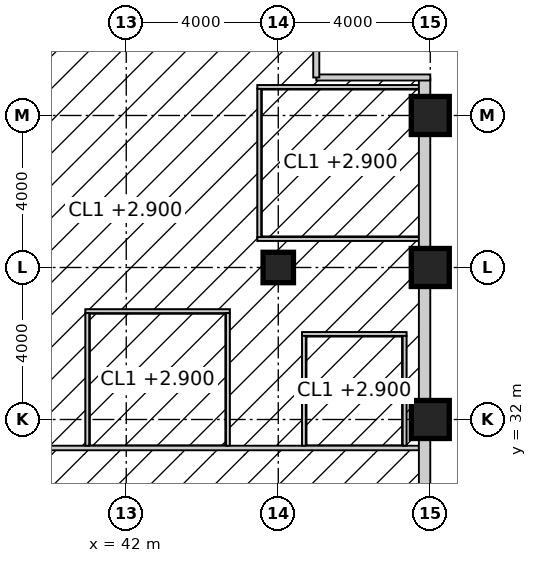
"""IFC4 building model, lengths in metres.
Left out: names, types, materials, properties, quantities, classifications, styles, units other than length and angle.
Written with IfcOpenShell. Run it as: python <this file> out.ifc"""

import sys

from ifc_helpers import new_model, si_unit, direction, frame, frame_2d, origin, origin_2d, place, context, subcontext, project, spatial, rectangle, hollow_rectangle, extrude, element, fill, save


model = new_model("IFC4")
c1 = context("Model", 3, precision=1e-05, world=origin(), true_north=direction((0.0, 1.0)))
c2 = subcontext(c1, "Body", "Model", "MODEL_VIEW")
j1 = project(units=[si_unit("LENGTHUNIT", "METRE"), si_unit("PLANEANGLEUNIT", "RADIAN")], contexts=[c1])
p1 = place(None, origin())
s1 = spatial("IfcSite", under=j1, at=p1, CompositionType="ELEMENT")
p2 = place(p1, origin())
s2 = spatial("IfcBuilding", under=s1, at=p2, CompositionType="ELEMENT")
p3 = place(p2, frame((0.0, 0.0, 254.2)))
s3 = spatial("IfcBuildingStorey", under=s2, at=p3, CompositionType="ELEMENT", Elevation=254.2)
for number, where, z_axis, x_axis in (
    (1, (50.0, 32.0, 0.0), (0.0, 0.0, 1.0), (1.0, 0.0, 0.0)),
    (2, (50.0, 36.0, 0.0), (0.0, 0.0, 1.0), (1.0, 0.0, 0.0)),
    (3, (50.0, 40.0, 0.0), (0.0, 0.0, 1.0), (1.0, 0.0, 0.0)),
):
    element("IfcColumn", number, at=place(p3, frame(where, z_axis=z_axis, x_axis=x_axis)), inside=s3, PredefinedType="COLUMN", context=c2, shape_type="SweptSolid", body=[
        extrude(hollow_rectangle(XDim=1.0, YDim=1.0, WallThickness=0.1, at=origin_2d()), origin(), (0.0, 0.0, 1.0), 4.0),
    ])
p4 = place(p3, frame((46.0, 36.0, 0.0), z_axis=(0.0, 0.0, 1.0), x_axis=(1.0, 0.0, 0.0)))
e4 = element("IfcColumn", 4, at=p4, inside=s3, PredefinedType="COLUMN", context=c2, shape_type="SweptSolid", body=[
    extrude(hollow_rectangle(XDim=0.8, YDim=0.8, WallThickness=0.08, at=origin_2d()), origin(), (0.0, 0.0, 1.0), 4.0),
])
p5 = place(p3, frame((38.575, 31.25, 0.0), z_axis=(0.0, 0.0, 1.0), x_axis=(1.0, 0.0, 0.0)))
e5 = element("IfcWall", 5, at=p5, inside=s3, PredefinedType="PARTITIONING", context=c2, shape_type="SweptSolid", body=[
    extrude(rectangle(XDim=11.125, YDim=0.12, at=frame_2d((5.562, 0.0))), origin(), (0.0, 0.0, 1.0), 3.85),
])
p6 = place(p3, frame((46.625, 34.25, 0.0), z_axis=(0.0, 0.0, 1.0), x_axis=(1.0, 0.0, 0.0)))
e6 = element("IfcWall", 6, at=p6, inside=s3, PredefinedType="PARTITIONING", context=c2, shape_type="SweptSolid", body=[
    extrude(rectangle(XDim=2.75, YDim=0.1, at=frame_2d((1.375, 0.0))), origin(), (0.0, 0.0, 1.0), 3.85),
])
p7 = place(p6, frame((0.875, 0.0, 0.0)))
e7 = element("IfcOpeningElement", 7, at=p7, cuts=e6, PredefinedType="OPENING", context=c2, shape_type="SweptSolid", body=[
    extrude(rectangle(XDim=1.0, YDim=2.2, at=frame_2d((0.5, 1.1))), frame((0.0, 0.06, 0.0), z_axis=(0.0, -1.0, 0.0), x_axis=(1.0, 0.0, 0.0)), (0.0, 0.0, 1.0), 0.12),
])
p8 = place(p3, frame((40.925, 34.85, 0.0), z_axis=(0.0, 0.0, 1.0), x_axis=(1.0, 0.0, 0.0)))
e8 = element("IfcWall", 8, at=p8, inside=s3, PredefinedType="PARTITIONING", context=c2, shape_type="SweptSolid", body=[
    extrude(rectangle(XDim=3.8, YDim=0.1, at=frame_2d((1.9, 0.0))), origin(), (0.0, 0.0, 1.0), 3.85),
])
p9 = place(p8, frame((1.4, 0.0, 0.0)))
e9 = element("IfcOpeningElement", 9, at=p9, cuts=e8, PredefinedType="OPENING", context=c2, shape_type="SweptSolid", body=[
    extrude(rectangle(XDim=1.0, YDim=2.2, at=frame_2d((0.5, 1.1))), frame((0.0, 0.06, 0.0), z_axis=(0.0, -1.0, 0.0), x_axis=(1.0, 0.0, 0.0)), (0.0, 0.0, 1.0), 0.12),
])
for number, where, z_axis, x_axis in (
    (10, (45.45, 36.75, 0.0), (0.0, 0.0, 1.0), (1.0, 0.0, 0.0)),
    (11, (45.45, 40.75, 0.0), (0.0, 0.0, 1.0), (1.0, 0.0, 0.0)),
):
    element("IfcWall", number, at=place(p3, frame(where, z_axis=z_axis, x_axis=x_axis)), inside=s3, PredefinedType="PARTITIONING", context=c2, shape_type="SweptSolid", body=[
        extrude(rectangle(XDim=4.25, YDim=0.1, at=frame_2d((2.125, 0.0))), origin(), (0.0, 0.0, 1.0), 3.85),
    ])
for number, where, z_axis, x_axis in (
    (12, (40.975, 31.31, 0.0), (0.0, 0.0, 1.0), (0.0, 1.0, 0.0)),
    (13, (44.675, 31.31, 0.0), (0.0, 0.0, 1.0), (0.0, 1.0, 0.0)),
):
    element("IfcWall", number, at=place(p3, frame(where, z_axis=z_axis, x_axis=x_axis)), inside=s3, PredefinedType="PARTITIONING", context=c2, shape_type="SweptSolid", body=[
        extrude(rectangle(XDim=3.49, YDim=0.1, at=frame_2d((1.745, 0.0))), origin(), (0.0, 0.0, 1.0), 3.85),
    ])
p10 = place(p3, frame((45.5, 36.8, 0.0), z_axis=(0.0, 0.0, 1.0), x_axis=(0.0, 1.0, 0.0)))
e14 = element("IfcWall", 14, at=p10, inside=s3, PredefinedType="PARTITIONING", context=c2, shape_type="SweptSolid", body=[
    extrude(rectangle(XDim=3.9, YDim=0.1, at=frame_2d((1.95, 0.0))), origin(), (0.0, 0.0, 1.0), 3.85),
])
p11 = place(p10, frame((1.45, 0.0, 0.0)))
e15 = element("IfcOpeningElement", 15, at=p11, cuts=e14, PredefinedType="OPENING", context=c2, shape_type="SweptSolid", body=[
    extrude(rectangle(XDim=1.0, YDim=2.2, at=frame_2d((0.5, 1.1))), frame((0.0, 0.06, 0.0), z_axis=(0.0, -1.0, 0.0), x_axis=(1.0, 0.0, 0.0)), (0.0, 0.0, 1.0), 0.12),
])
for number, where, z_axis, x_axis in (
    (16, (46.675, 31.31, 0.0), (0.0, 0.0, 1.0), (0.0, 1.0, 0.0)),
    (17, (49.325, 31.31, 0.0), (0.0, 0.0, 1.0), (0.0, 1.0, 0.0)),
):
    element("IfcWall", number, at=place(p3, frame(where, z_axis=z_axis, x_axis=x_axis)), inside=s3, PredefinedType="PARTITIONING", context=c2, shape_type="SweptSolid", body=[
        extrude(rectangle(XDim=2.89, YDim=0.1, at=frame_2d((1.445, 0.0))), origin(), (0.0, 0.0, 1.0), 3.85),
    ])
p12 = place(p3, frame((49.85, 28.5, 0.0), z_axis=(0.0, 0.0, 1.0), x_axis=(0.0, 1.0, 0.0)))
e18 = element("IfcWall", 18, at=p12, inside=s3, PredefinedType="ELEMENTEDWALL", context=c2, shape_type="SweptSolid", body=[
    extrude(rectangle(XDim=3.0, YDim=0.3, at=frame_2d((1.5, 0.0))), origin(), (0.0, 0.0, 1.0), 2.85),
])
p13 = place(p12, frame((0.5, 0.0, 0.8)))
e19 = element("IfcOpeningElement", 19, at=p13, cuts=e18, PredefinedType="OPENING", context=c2, shape_type="SweptSolid", body=[
    extrude(rectangle(XDim=2.0, YDim=2.0, at=frame_2d((1.0, 1.0))), frame((0.0, 0.16, 0.0), z_axis=(0.0, -1.0, 0.0), x_axis=(1.0, 0.0, 0.0)), (0.0, 0.0, 1.0), 0.32),
])
p14 = place(p3, frame((49.85, 32.5, 0.0), z_axis=(0.0, 0.0, 1.0), x_axis=(0.0, 1.0, 0.0)))
e20 = element("IfcWall", 20, at=p14, inside=s3, PredefinedType="ELEMENTEDWALL", context=c2, shape_type="SweptSolid", body=[
    extrude(rectangle(XDim=3.0, YDim=0.3, at=frame_2d((1.5, 0.0))), origin(), (0.0, 0.0, 1.0), 2.85),
])
p15 = place(p14, frame((0.5, 0.0, 0.8)))
e21 = element("IfcOpeningElement", 21, at=p15, cuts=e20, PredefinedType="OPENING", context=c2, shape_type="SweptSolid", body=[
    extrude(rectangle(XDim=2.0, YDim=2.0, at=frame_2d((1.0, 1.0))), frame((0.0, 0.16, 0.0), z_axis=(0.0, -1.0, 0.0), x_axis=(1.0, 0.0, 0.0)), (0.0, 0.0, 1.0), 0.32),
])
p16 = place(p3, frame((49.85, 36.5, 0.0), z_axis=(0.0, 0.0, 1.0), x_axis=(0.0, 1.0, 0.0)))
e22 = element("IfcWall", 22, at=p16, inside=s3, PredefinedType="ELEMENTEDWALL", context=c2, shape_type="SweptSolid", body=[
    extrude(rectangle(XDim=3.0, YDim=0.3, at=frame_2d((1.5, 0.0))), origin(), (0.0, 0.0, 1.0), 2.85),
])
p17 = place(p16, frame((0.5, 0.0, 0.8)))
e23 = element("IfcOpeningElement", 23, at=p17, cuts=e22, PredefinedType="OPENING", context=c2, shape_type="SweptSolid", body=[
    extrude(rectangle(XDim=2.0, YDim=2.0, at=frame_2d((1.0, 1.0))), frame((0.0, 0.16, 0.0), z_axis=(0.0, -1.0, 0.0), x_axis=(1.0, 0.0, 0.0)), (0.0, 0.0, 1.0), 0.32),
])
p18 = place(p3, frame((49.85, 40.5, 0.0), z_axis=(0.0, 0.0, 1.0), x_axis=(0.0, 1.0, 0.0)))
e24 = element("IfcWall", 24, at=p18, inside=s3, PredefinedType="ELEMENTEDWALL", context=c2, shape_type="SweptSolid", body=[
    extrude(rectangle(XDim=0.47, YDim=0.3, at=frame_2d((0.235, 0.0))), origin(), (0.0, 0.0, 1.0), 2.95),
])
p19 = place(p11, origin())
e25 = element("IfcDoor", 25, at=p19, inside=s3, OperationType="SINGLE_SWING_LEFT", PredefinedType="DOOR", context=c2, shape_type="SweptSolid", body=[
    extrude(rectangle(XDim=1.0, YDim=2.2, at=frame_2d((0.5, 1.1))), frame((0.0, 0.025, 0.0), z_axis=(0.0, -1.0, 0.0), x_axis=(1.0, 0.0, 0.0)), (0.0, 0.0, 1.0), 0.05),
])
fill(e15, e25)
p20 = place(p9, origin())
e26 = element("IfcDoor", 26, at=p20, inside=s3, OperationType="SINGLE_SWING_RIGHT", PredefinedType="DOOR", context=c2, shape_type="SweptSolid", body=[
    extrude(rectangle(XDim=1.0, YDim=2.2, at=frame_2d((0.5, 1.1))), frame((0.0, 0.025, 0.0), z_axis=(0.0, -1.0, 0.0), x_axis=(1.0, 0.0, 0.0)), (0.0, 0.0, 1.0), 0.05),
])
fill(e9, e26)
p21 = place(p7, origin())
e27 = element("IfcDoor", 27, at=p21, inside=s3, OperationType="SINGLE_SWING_LEFT", PredefinedType="DOOR", context=c2, shape_type="SweptSolid", body=[
    extrude(rectangle(XDim=1.0, YDim=2.2, at=frame_2d((0.5, 1.1))), frame((0.0, 0.025, 0.0), z_axis=(0.0, -1.0, 0.0), x_axis=(1.0, 0.0, 0.0)), (0.0, 0.0, 1.0), 0.05),
])
fill(e7, e27)
p22 = place(p13, origin())
e28 = element("IfcWindow", 28, at=p22, inside=s3, PartitioningType="SINGLE_PANEL", PredefinedType="WINDOW", context=c2, shape_type="SweptSolid", body=[
    extrude(rectangle(XDim=2.0, YDim=2.0, at=frame_2d((1.0, 1.0))), frame((0.0, 0.03, 0.0), z_axis=(0.0, -1.0, 0.0), x_axis=(1.0, 0.0, 0.0)), (0.0, 0.0, 1.0), 0.06),
])
fill(e19, e28)
p23 = place(p15, origin())
e29 = element("IfcWindow", 29, at=p23, inside=s3, PartitioningType="SINGLE_PANEL", PredefinedType="WINDOW", context=c2, shape_type="SweptSolid", body=[
    extrude(rectangle(XDim=2.0, YDim=2.0, at=frame_2d((1.0, 1.0))), frame((0.0, 0.03, 0.0), z_axis=(0.0, -1.0, 0.0), x_axis=(1.0, 0.0, 0.0)), (0.0, 0.0, 1.0), 0.06),
])
fill(e21, e29)
p24 = place(p17, origin())
e30 = element("IfcWindow", 30, at=p24, inside=s3, PartitioningType="SINGLE_PANEL", PredefinedType="WINDOW", context=c2, shape_type="SweptSolid", body=[
    extrude(rectangle(XDim=2.0, YDim=2.0, at=frame_2d((1.0, 1.0))), frame((0.0, 0.03, 0.0), z_axis=(0.0, -1.0, 0.0), x_axis=(1.0, 0.0, 0.0)), (0.0, 0.0, 1.0), 0.06),
])
fill(e23, e30)
save(model, sys.argv[1])
